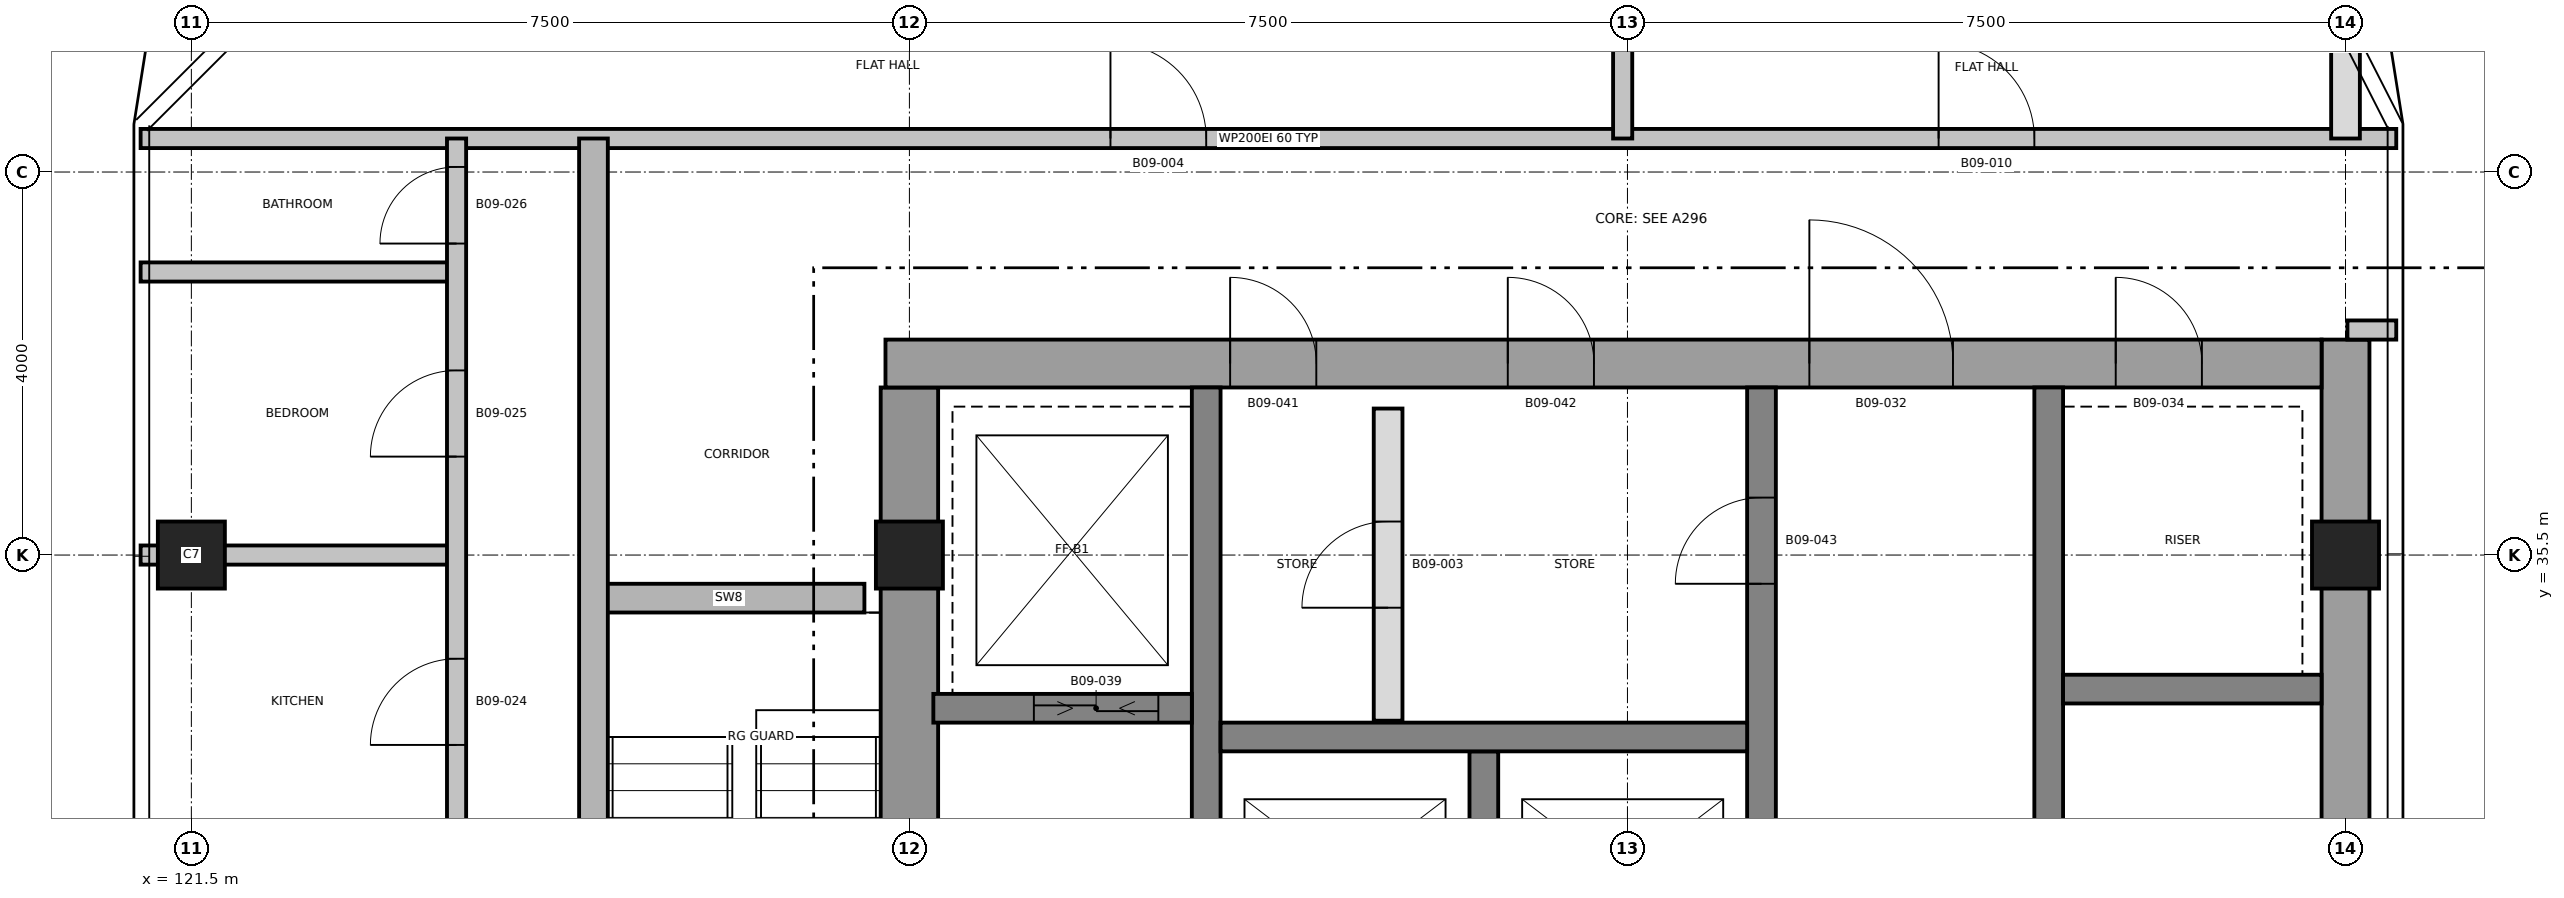
"""IFC4 building model, lengths in metres.
Left out: names, types, materials, properties, quantities, classifications, styles, units other than length and angle.
Written with IfcOpenShell. Run it as: python <this file> out.ifc"""

import sys

from ifc_helpers import new_model, si_unit, direction, frame, frame_2d, origin, origin_2d, place, context, subcontext, project, spatial, rectangle, extrude, element, fill, save


model = new_model("IFC4")
c1 = context("Model", 3, precision=1e-05, world=origin(), true_north=direction((0.0, 1.0)))
c2 = subcontext(c1, "Body", "Model", "MODEL_VIEW")
j1 = project(units=[si_unit("LENGTHUNIT", "METRE"), si_unit("PLANEANGLEUNIT", "RADIAN")], contexts=[c1])
p1 = place(None, origin())
s1 = spatial("IfcSite", under=j1, at=p1, CompositionType="ELEMENT")
p2 = place(p1, origin())
s2 = spatial("IfcBuilding", under=s1, at=p2, CompositionType="ELEMENT")
p3 = place(p2, frame((0.0, 0.0, 98.2)))
s3 = spatial("IfcBuildingStorey", under=s2, at=p3, CompositionType="ELEMENT", Elevation=98.2)
p4 = place(p3, frame((129.0, 24.75, 0.0), z_axis=(0.0, 0.0, 1.0), x_axis=(0.0, 1.0, 0.0)))
e1 = element("IfcWall", 1, at=p4, inside=s3, PredefinedType="SHEAR", context=c2, shape_type="SweptSolid", body=[
    extrude(rectangle(XDim=12.5, YDim=0.6, at=frame_2d((6.25, 0.0))), origin(), (0.0, 0.0, 1.0), 3.7),
])
p5 = place(p4, frame((5.15, 0.0, 0.0)))
e2 = element("IfcOpeningElement", 2, at=p5, cuts=e1, PredefinedType="OPENING", context=c2, shape_type="SweptSolid", body=[
    extrude(rectangle(XDim=1.0, YDim=2.1, at=frame_2d((0.5, 1.05))), frame((0.0, 0.31, 0.0), z_axis=(0.0, -1.0, 0.0), x_axis=(1.0, 0.0, 0.0)), (0.0, 0.0, 1.0), 0.62),
])
p6 = place(p3, frame((144.0, 24.25, 0.0), z_axis=(0.0, 0.0, 1.0), x_axis=(0.0, 1.0, 0.0)))
e3 = element("IfcWall", 3, at=p6, inside=s3, PredefinedType="SHEAR", context=c2, shape_type="SweptSolid", body=[
    extrude(rectangle(XDim=13.5, YDim=0.5, at=frame_2d((6.75, 0.0))), origin(), (0.0, 0.0, 1.0), 3.7),
])
p7 = place(p3, frame((128.75, 37.5, 0.0), z_axis=(0.0, 0.0, 1.0), x_axis=(1.0, 0.0, 0.0)))
e4 = element("IfcWall", 4, at=p7, inside=s3, PredefinedType="SHEAR", context=c2, shape_type="SweptSolid", body=[
    extrude(rectangle(XDim=15.0, YDim=0.5, at=frame_2d((7.5, 0.0))), origin(), (0.0, 0.0, 1.0), 3.7),
])
p8 = place(p7, frame((9.65, 0.0, 0.0)))
e5 = element("IfcOpeningElement", 5, at=p8, cuts=e4, PredefinedType="OPENING", context=c2, shape_type="SweptSolid", body=[
    extrude(rectangle(XDim=1.5, YDim=2.1, at=frame_2d((0.75, 1.05))), frame((0.0, 0.26, 0.0), z_axis=(0.0, -1.0, 0.0), x_axis=(1.0, 0.0, 0.0)), (0.0, 0.0, 1.0), 0.52),
])
p9 = place(p7, frame((12.85, 0.0, 0.0)))
e6 = element("IfcOpeningElement", 6, at=p9, cuts=e4, PredefinedType="OPENING", context=c2, shape_type="SweptSolid", body=[
    extrude(rectangle(XDim=0.9, YDim=2.1, at=frame_2d((0.45, 1.05))), frame((0.0, 0.26, 0.0), z_axis=(0.0, -1.0, 0.0), x_axis=(1.0, 0.0, 0.0)), (0.0, 0.0, 1.0), 0.52),
])
p10 = place(p7, frame((3.6, 0.0, 0.0)))
e7 = element("IfcOpeningElement", 7, at=p10, cuts=e4, PredefinedType="OPENING", context=c2, shape_type="SweptSolid", body=[
    extrude(rectangle(XDim=0.9, YDim=2.1, at=frame_2d((0.45, 1.05))), frame((0.0, 0.26, 0.0), z_axis=(0.0, -1.0, 0.0), x_axis=(1.0, 0.0, 0.0)), (0.0, 0.0, 1.0), 0.52),
])
p11 = place(p7, frame((6.5, 0.0, 0.0)))
e8 = element("IfcOpeningElement", 8, at=p11, cuts=e4, PredefinedType="OPENING", context=c2, shape_type="SweptSolid", body=[
    extrude(rectangle(XDim=0.9, YDim=2.1, at=frame_2d((0.45, 1.05))), frame((0.0, 0.26, 0.0), z_axis=(0.0, -1.0, 0.0), x_axis=(1.0, 0.0, 0.0)), (0.0, 0.0, 1.0), 0.52),
])
p12 = place(p3, frame((132.1, 24.75, 0.0), z_axis=(0.0, 0.0, 1.0), x_axis=(0.0, 1.0, 0.0)))
e9 = element("IfcWall", 9, at=p12, inside=s3, PredefinedType="SHEAR", context=c2, shape_type="SweptSolid", body=[
    extrude(rectangle(XDim=12.5, YDim=0.3, at=frame_2d((6.25, 0.0))), origin(), (0.0, 0.0, 1.0), 3.7),
])
p13 = place(p12, frame((3.9, 0.0, 0.0)))
e10 = element("IfcOpeningElement", 10, at=p13, cuts=e9, PredefinedType="OPENING", context=c2, shape_type="SweptSolid", body=[
    extrude(rectangle(XDim=1.2, YDim=2.1, at=frame_2d((0.6, 1.05))), frame((0.0, 0.16, 0.0), z_axis=(0.0, -1.0, 0.0), x_axis=(1.0, 0.0, 0.0)), (0.0, 0.0, 1.0), 0.32),
])
p14 = place(p3, frame((137.9, 24.75, 0.0), z_axis=(0.0, 0.0, 1.0), x_axis=(0.0, 1.0, 0.0)))
e11 = element("IfcWall", 11, at=p14, inside=s3, PredefinedType="SHEAR", context=c2, shape_type="SweptSolid", body=[
    extrude(rectangle(XDim=12.5, YDim=0.3, at=frame_2d((6.25, 0.0))), origin(), (0.0, 0.0, 1.0), 3.7),
])
p15 = place(p14, frame((3.95, 0.0, 0.0)))
e12 = element("IfcOpeningElement", 12, at=p15, cuts=e11, PredefinedType="OPENING", context=c2, shape_type="SweptSolid", body=[
    extrude(rectangle(XDim=1.5, YDim=2.1, at=frame_2d((0.75, 1.05))), frame((0.0, 0.16, 0.0), z_axis=(0.0, -1.0, 0.0), x_axis=(1.0, 0.0, 0.0)), (0.0, 0.0, 1.0), 0.32),
])
p16 = place(p14, frame((10.45, 0.0, 0.0)))
e13 = element("IfcOpeningElement", 13, at=p16, cuts=e11, PredefinedType="OPENING", context=c2, shape_type="SweptSolid", body=[
    extrude(rectangle(XDim=0.9, YDim=2.1, at=frame_2d((0.45, 1.05))), frame((0.0, 0.16, 0.0), z_axis=(0.0, -1.0, 0.0), x_axis=(1.0, 0.0, 0.0)), (0.0, 0.0, 1.0), 0.32),
])
p17 = place(p3, frame((140.9, 24.75, 0.0), z_axis=(0.0, 0.0, 1.0), x_axis=(0.0, 1.0, 0.0)))
e14 = element("IfcWall", 14, at=p17, inside=s3, PredefinedType="SHEAR", context=c2, shape_type="SweptSolid", body=[
    extrude(rectangle(XDim=12.5, YDim=0.3, at=frame_2d((6.25, 0.0))), origin(), (0.0, 0.0, 1.0), 3.7),
])
p18 = place(p17, frame((5.9, 0.0, 0.0)))
e15 = element("IfcOpeningElement", 15, at=p18, cuts=e14, PredefinedType="OPENING", context=c2, shape_type="SweptSolid", body=[
    extrude(rectangle(XDim=1.2, YDim=2.1, at=frame_2d((0.6, 1.05))), frame((0.0, 0.16, 0.0), z_axis=(0.0, -1.0, 0.0), x_axis=(1.0, 0.0, 0.0)), (0.0, 0.0, 1.0), 0.32),
])
p19 = place(p3, frame((135.0, 30.85, 0.0), z_axis=(0.0, 0.0, 1.0), x_axis=(0.0, 1.0, 0.0)))
e16 = element("IfcWall", 16, at=p19, inside=s3, PredefinedType="SHEAR", context=c2, shape_type="SweptSolid", body=[
    extrude(rectangle(XDim=2.6, YDim=0.3, at=frame_2d((1.3, 0.0))), origin(), (0.0, 0.0, 1.0), 3.7),
])
p20 = place(p3, frame((132.25, 33.6, 0.0), z_axis=(0.0, 0.0, 1.0), x_axis=(1.0, 0.0, 0.0)))
e17 = element("IfcWall", 17, at=p20, inside=s3, PredefinedType="SHEAR", context=c2, shape_type="SweptSolid", body=[
    extrude(rectangle(XDim=5.5, YDim=0.3, at=frame_2d((2.75, 0.0))), origin(), (0.0, 0.0, 1.0), 3.7),
])
p21 = place(p3, frame((129.25, 33.9, 0.0), z_axis=(0.0, 0.0, 1.0), x_axis=(1.0, 0.0, 0.0)))
e18 = element("IfcWall", 18, at=p21, inside=s3, PredefinedType="SHEAR", context=c2, shape_type="SweptSolid", body=[
    extrude(rectangle(XDim=2.7, YDim=0.3, at=frame_2d((1.35, 0.0))), origin(), (0.0, 0.0, 1.0), 3.7),
])
p22 = place(p21, frame((1.05, 0.0, 0.0)))
e19 = element("IfcOpeningElement", 19, at=p22, cuts=e18, PredefinedType="OPENING", context=c2, shape_type="SweptSolid", body=[
    extrude(rectangle(XDim=1.3, YDim=2.4, at=frame_2d((0.65, 1.2))), frame((0.0, 0.16, 0.0), z_axis=(0.0, -1.0, 0.0), x_axis=(1.0, 0.0, 0.0)), (0.0, 0.0, 1.0), 0.32),
])
p23 = place(p3, frame((141.05, 34.1, 0.0), z_axis=(0.0, 0.0, 1.0), x_axis=(1.0, 0.0, 0.0)))
e20 = element("IfcWall", 20, at=p23, inside=s3, PredefinedType="SHEAR", context=c2, shape_type="SweptSolid", body=[
    extrude(rectangle(XDim=2.7, YDim=0.3, at=frame_2d((1.35, 0.0))), origin(), (0.0, 0.0, 1.0), 3.7),
])
for number, where, z_axis, x_axis in (
    (21, (121.5, 35.5, 0.0), (0.0, 0.0, 1.0), (1.0, 0.0, 0.0)),
    (22, (129.0, 35.5, 0.0), (0.0, 0.0, 1.0), (1.0, 0.0, 0.0)),
    (23, (144.0, 35.5, 0.0), (0.0, 0.0, 1.0), (1.0, 0.0, 0.0)),
):
    element("IfcColumn", number, at=place(p3, frame(where, z_axis=z_axis, x_axis=x_axis)), inside=s3, PredefinedType="COLUMN", context=c2, shape_type="SweptSolid", body=[
        extrude(rectangle(XDim=0.7, YDim=0.7, at=origin_2d()), origin(), (0.0, 0.0, 1.0), 3.7),
    ])
p24 = place(p3, frame((125.7, 35.05, 0.0), z_axis=(0.0, 0.0, 1.0), x_axis=(1.0, 0.0, 0.0)))
e24 = element("IfcWall", 24, at=p24, inside=s3, PredefinedType="SHEAR", context=c2, shape_type="SweptSolid", body=[
    extrude(rectangle(XDim=2.83, YDim=0.3, at=frame_2d((1.415, 0.0))), origin(), (0.0, 0.0, 1.0), 3.4),
])
p25 = place(p3, frame((120.97, 35.5, 0.0), z_axis=(0.0, 0.0, 1.0), x_axis=(1.0, 0.0, 0.0)))
e25 = element("IfcWall", 25, at=p25, inside=s3, PredefinedType="PARTITIONING", context=c2, shape_type="SweptSolid", body=[
    extrude(rectangle(XDim=3.3, YDim=0.2, at=frame_2d((1.65, 0.0))), origin(), (0.0, 0.0, 1.0), 3.4),
])
p26 = place(p3, frame((144.02, 37.85, 0.0), z_axis=(0.0, 0.0, 1.0), x_axis=(1.0, 0.0, 0.0)))
e26 = element("IfcWall", 26, at=p26, inside=s3, PredefinedType="PARTITIONING", context=c2, shape_type="SweptSolid", body=[
    extrude(rectangle(XDim=0.51, YDim=0.2, at=frame_2d((0.255, 0.0))), origin(), (0.0, 0.0, 1.0), 3.4),
])
p27 = place(p3, frame((120.97, 38.456, 0.0), z_axis=(0.0, 0.0, 1.0), x_axis=(1.0, 0.0, 0.0)))
e27 = element("IfcWall", 27, at=p27, inside=s3, PredefinedType="PARTITIONING", context=c2, shape_type="SweptSolid", body=[
    extrude(rectangle(XDim=3.3, YDim=0.2, at=frame_2d((1.65, 0.0))), origin(), (0.0, 0.0, 1.0), 3.4),
])
p28 = place(p3, frame((120.97, 39.85, 0.0), z_axis=(0.0, 0.0, 1.0), x_axis=(1.0, 0.0, 0.0)))
e28 = element("IfcWall", 28, at=p28, inside=s3, PredefinedType="PARTITIONING", context=c2, shape_type="SweptSolid", body=[
    extrude(rectangle(XDim=23.56, YDim=0.2, at=frame_2d((11.78, 0.0))), origin(), (0.0, 0.0, 1.0), 3.4),
])
p29 = place(p28, frame((10.13, 0.0, 0.0)))
e29 = element("IfcOpeningElement", 29, at=p29, cuts=e28, PredefinedType="OPENING", context=c2, shape_type="SweptSolid", body=[
    extrude(rectangle(XDim=1.0, YDim=2.1, at=frame_2d((0.5, 1.05))), frame((0.0, 0.11, 0.0), z_axis=(0.0, -1.0, 0.0), x_axis=(1.0, 0.0, 0.0)), (0.0, 0.0, 1.0), 0.22),
])
p30 = place(p28, frame((18.78, 0.0, 0.0)))
e30 = element("IfcOpeningElement", 30, at=p30, cuts=e28, PredefinedType="OPENING", context=c2, shape_type="SweptSolid", body=[
    extrude(rectangle(XDim=1.0, YDim=2.1, at=frame_2d((0.5, 1.05))), frame((0.0, 0.11, 0.0), z_axis=(0.0, -1.0, 0.0), x_axis=(1.0, 0.0, 0.0)), (0.0, 0.0, 1.0), 0.22),
])
p31 = place(p3, frame((124.27, 22.15, 0.0), z_axis=(0.0, 0.0, 1.0), x_axis=(0.0, 1.0, 0.0)))
e31 = element("IfcWall", 31, at=p31, inside=s3, PredefinedType="PARTITIONING", context=c2, shape_type="SweptSolid", body=[
    extrude(rectangle(XDim=17.7, YDim=0.2, at=frame_2d((8.85, 0.0))), origin(), (0.0, 0.0, 1.0), 3.4),
])
p32 = place(p31, frame((1.725, 0.0, 0.0)))
e32 = element("IfcOpeningElement", 32, at=p32, cuts=e31, PredefinedType="OPENING", context=c2, shape_type="SweptSolid", body=[
    extrude(rectangle(XDim=0.9, YDim=2.1, at=frame_2d((0.45, 1.05))), frame((0.0, 0.11, 0.0), z_axis=(0.0, -1.0, 0.0), x_axis=(1.0, 0.0, 0.0)), (0.0, 0.0, 1.0), 0.22),
])
p33 = place(p31, frame((6.867, 0.0, 0.0)))
e33 = element("IfcOpeningElement", 33, at=p33, cuts=e31, PredefinedType="OPENING", context=c2, shape_type="SweptSolid", body=[
    extrude(rectangle(XDim=0.9, YDim=2.1, at=frame_2d((0.45, 1.05))), frame((0.0, 0.11, 0.0), z_axis=(0.0, -1.0, 0.0), x_axis=(1.0, 0.0, 0.0)), (0.0, 0.0, 1.0), 0.22),
])
p34 = place(p31, frame((11.367, 0.0, 0.0)))
e34 = element("IfcOpeningElement", 34, at=p34, cuts=e31, PredefinedType="OPENING", context=c2, shape_type="SweptSolid", body=[
    extrude(rectangle(XDim=0.9, YDim=2.1, at=frame_2d((0.45, 1.05))), frame((0.0, 0.11, 0.0), z_axis=(0.0, -1.0, 0.0), x_axis=(1.0, 0.0, 0.0)), (0.0, 0.0, 1.0), 0.22),
])
p35 = place(p31, frame((14.378, 0.0, 0.0)))
e35 = element("IfcOpeningElement", 35, at=p35, cuts=e31, PredefinedType="OPENING", context=c2, shape_type="SweptSolid", body=[
    extrude(rectangle(XDim=0.9, YDim=2.1, at=frame_2d((0.45, 1.05))), frame((0.0, 0.11, 0.0), z_axis=(0.0, -1.0, 0.0), x_axis=(1.0, 0.0, 0.0)), (0.0, 0.0, 1.0), 0.22),
])
p36 = place(p31, frame((16.603, 0.0, 0.0)))
e36 = element("IfcOpeningElement", 36, at=p36, cuts=e31, PredefinedType="OPENING", context=c2, shape_type="SweptSolid", body=[
    extrude(rectangle(XDim=0.8, YDim=2.1, at=frame_2d((0.4, 1.05))), frame((0.0, 0.11, 0.0), z_axis=(0.0, -1.0, 0.0), x_axis=(1.0, 0.0, 0.0)), (0.0, 0.0, 1.0), 0.22),
])
p37 = place(p3, frame((125.7, 22.15, 0.0), z_axis=(0.0, 0.0, 1.0), x_axis=(0.0, 1.0, 0.0)))
e37 = element("IfcWall", 37, at=p37, inside=s3, PredefinedType="SHEAR", context=c2, shape_type="SweptSolid", body=[
    extrude(rectangle(XDim=17.7, YDim=0.3, at=frame_2d((8.85, 0.0))), origin(), (0.0, 0.0, 1.0), 3.4),
])
p38 = place(p37, frame((2.7, 0.0, 0.0)))
e38 = element("IfcOpeningElement", 38, at=p38, cuts=e37, PredefinedType="OPENING", context=c2, shape_type="SweptSolid", body=[
    extrude(rectangle(XDim=1.0, YDim=2.1, at=frame_2d((0.5, 1.05))), frame((0.0, 0.16, 0.0), z_axis=(0.0, -1.0, 0.0), x_axis=(1.0, 0.0, 0.0)), (0.0, 0.0, 1.0), 0.32),
])
p39 = place(p3, frame((134.0, 33.77, 0.0), z_axis=(0.0, 0.0, 1.0), x_axis=(0.0, 1.0, 0.0)))
e39 = element("IfcWall", 39, at=p39, inside=s3, PredefinedType="PARTITIONING", context=c2, shape_type="SweptSolid", body=[
    extrude(rectangle(XDim=3.26, YDim=0.3, at=frame_2d((1.63, 0.0))), origin(), (0.0, 0.0, 1.0), 3.4),
])
p40 = place(p39, frame((1.18, 0.0, 0.0)))
e40 = element("IfcOpeningElement", 40, at=p40, cuts=e39, PredefinedType="OPENING", context=c2, shape_type="SweptSolid", body=[
    extrude(rectangle(XDim=0.9, YDim=2.1, at=frame_2d((0.45, 1.05))), frame((0.0, 0.16, 0.0), z_axis=(0.0, -1.0, 0.0), x_axis=(1.0, 0.0, 0.0)), (0.0, 0.0, 1.0), 0.32),
])
p41 = place(p3, frame((136.45, 39.85, 0.0), z_axis=(0.0, 0.0, 1.0), x_axis=(0.0, 1.0, 0.0)))
e41 = element("IfcWall", 41, at=p41, inside=s3, PredefinedType="PARTITIONING", context=c2, shape_type="SweptSolid", body=[
    extrude(rectangle(XDim=5.18, YDim=0.2, at=frame_2d((2.59, 0.0))), origin(), (0.0, 0.0, 1.0), 3.4),
])
p42 = place(p3, frame((144.0, 39.85, 0.0), z_axis=(0.0, 0.0, 1.0), x_axis=(0.0, 1.0, 0.0)))
e42 = element("IfcWall", 42, at=p42, inside=s3, PredefinedType="PARTITIONING", context=c2, shape_type="SweptSolid", body=[
    extrude(rectangle(XDim=2.259, YDim=0.3, at=frame_2d((1.129, 0.0))), origin(), (0.0, 0.0, 1.0), 3.4),
])
p43 = place(p40, origin())
e43 = element("IfcDoor", 43, at=p43, inside=s3, OperationType="SINGLE_SWING_LEFT", PredefinedType="DOOR", context=c2, shape_type="SweptSolid", body=[
    extrude(rectangle(XDim=0.9, YDim=2.1, at=frame_2d((0.45, 1.05))), frame((0.0, 0.025, 0.0), z_axis=(0.0, -1.0, 0.0), x_axis=(1.0, 0.0, 0.0)), (0.0, 0.0, 1.0), 0.05),
])
fill(e40, e43)
p44 = place(p29, origin())
e44 = element("IfcDoor", 44, at=p44, inside=s3, OperationType="SINGLE_SWING_RIGHT", PredefinedType="DOOR", context=c2, shape_type="SweptSolid", body=[
    extrude(rectangle(XDim=1.0, YDim=2.1, at=frame_2d((0.5, 1.05))), frame((0.0, 0.025, 0.0), z_axis=(0.0, -1.0, 0.0), x_axis=(1.0, 0.0, 0.0)), (0.0, 0.0, 1.0), 0.05),
])
fill(e29, e44)
p45 = place(p30, origin())
e45 = element("IfcDoor", 45, at=p45, inside=s3, OperationType="SINGLE_SWING_RIGHT", PredefinedType="DOOR", context=c2, shape_type="SweptSolid", body=[
    extrude(rectangle(XDim=1.0, YDim=2.1, at=frame_2d((0.5, 1.05))), frame((0.0, 0.025, 0.0), z_axis=(0.0, -1.0, 0.0), x_axis=(1.0, 0.0, 0.0)), (0.0, 0.0, 1.0), 0.05),
])
fill(e30, e45)
p46 = place(p34, origin())
e46 = element("IfcDoor", 46, at=p46, inside=s3, OperationType="SINGLE_SWING_RIGHT", PredefinedType="DOOR", context=c2, shape_type="SweptSolid", body=[
    extrude(rectangle(XDim=0.9, YDim=2.1, at=frame_2d((0.45, 1.05))), frame((0.0, 0.025, 0.0), z_axis=(0.0, -1.0, 0.0), x_axis=(1.0, 0.0, 0.0)), (0.0, 0.0, 1.0), 0.05),
])
fill(e34, e46)
p47 = place(p35, origin())
e47 = element("IfcDoor", 47, at=p47, inside=s3, OperationType="SINGLE_SWING_LEFT", PredefinedType="DOOR", context=c2, shape_type="SweptSolid", body=[
    extrude(rectangle(XDim=0.9, YDim=2.1, at=frame_2d((0.45, 1.05))), frame((0.0, 0.025, 0.0), z_axis=(0.0, -1.0, 0.0), x_axis=(1.0, 0.0, 0.0)), (0.0, 0.0, 1.0), 0.05),
])
fill(e35, e47)
p48 = place(p36, origin())
e48 = element("IfcDoor", 48, at=p48, inside=s3, OperationType="SINGLE_SWING_RIGHT", PredefinedType="DOOR", context=c2, shape_type="SweptSolid", body=[
    extrude(rectangle(XDim=0.8, YDim=2.1, at=frame_2d((0.4, 1.05))), frame((0.0, 0.025, 0.0), z_axis=(0.0, -1.0, 0.0), x_axis=(1.0, 0.0, 0.0)), (0.0, 0.0, 1.0), 0.05),
])
fill(e36, e48)
p49 = place(p8, origin())
e49 = element("IfcDoor", 49, at=p49, inside=s3, OperationType="SINGLE_SWING_RIGHT", PredefinedType="DOOR", context=c2, shape_type="SweptSolid", body=[
    extrude(rectangle(XDim=1.5, YDim=2.1, at=frame_2d((0.75, 1.05))), frame((0.0, 0.025, 0.0), z_axis=(0.0, -1.0, 0.0), x_axis=(1.0, 0.0, 0.0)), (0.0, 0.0, 1.0), 0.05),
])
fill(e5, e49)
p50 = place(p9, origin())
e50 = element("IfcDoor", 50, at=p50, inside=s3, OperationType="SINGLE_SWING_RIGHT", PredefinedType="DOOR", context=c2, shape_type="SweptSolid", body=[
    extrude(rectangle(XDim=0.9, YDim=2.1, at=frame_2d((0.45, 1.05))), frame((0.0, 0.025, 0.0), z_axis=(0.0, -1.0, 0.0), x_axis=(1.0, 0.0, 0.0)), (0.0, 0.0, 1.0), 0.05),
])
fill(e6, e50)
p51 = place(p22, origin())
e51 = element("IfcDoor", 51, at=p51, inside=s3, OperationType="SLIDING_TO_LEFT", PredefinedType="DOOR", context=c2, shape_type="SweptSolid", body=[
    extrude(rectangle(XDim=1.3, YDim=2.4, at=frame_2d((0.65, 1.2))), frame((0.0, 0.025, 0.0), z_axis=(0.0, -1.0, 0.0), x_axis=(1.0, 0.0, 0.0)), (0.0, 0.0, 1.0), 0.05),
])
fill(e19, e51)
p52 = place(p10, origin())
e52 = element("IfcDoor", 52, at=p52, inside=s3, OperationType="SINGLE_SWING_LEFT", PredefinedType="DOOR", context=c2, shape_type="SweptSolid", body=[
    extrude(rectangle(XDim=0.9, YDim=2.1, at=frame_2d((0.45, 1.05))), frame((0.0, 0.025, 0.0), z_axis=(0.0, -1.0, 0.0), x_axis=(1.0, 0.0, 0.0)), (0.0, 0.0, 1.0), 0.05),
])
fill(e7, e52)
p53 = place(p11, origin())
e53 = element("IfcDoor", 53, at=p53, inside=s3, OperationType="SINGLE_SWING_RIGHT", PredefinedType="DOOR", context=c2, shape_type="SweptSolid", body=[
    extrude(rectangle(XDim=0.9, YDim=2.1, at=frame_2d((0.45, 1.05))), frame((0.0, 0.025, 0.0), z_axis=(0.0, -1.0, 0.0), x_axis=(1.0, 0.0, 0.0)), (0.0, 0.0, 1.0), 0.05),
])
fill(e8, e53)
p54 = place(p16, origin())
e54 = element("IfcDoor", 54, at=p54, inside=s3, OperationType="SINGLE_SWING_RIGHT", PredefinedType="DOOR", context=c2, shape_type="SweptSolid", body=[
    extrude(rectangle(XDim=0.9, YDim=2.1, at=frame_2d((0.45, 1.05))), frame((0.0, 0.025, 0.0), z_axis=(0.0, -1.0, 0.0), x_axis=(1.0, 0.0, 0.0)), (0.0, 0.0, 1.0), 0.05),
])
fill(e13, e54)
save(model, sys.argv[1])
